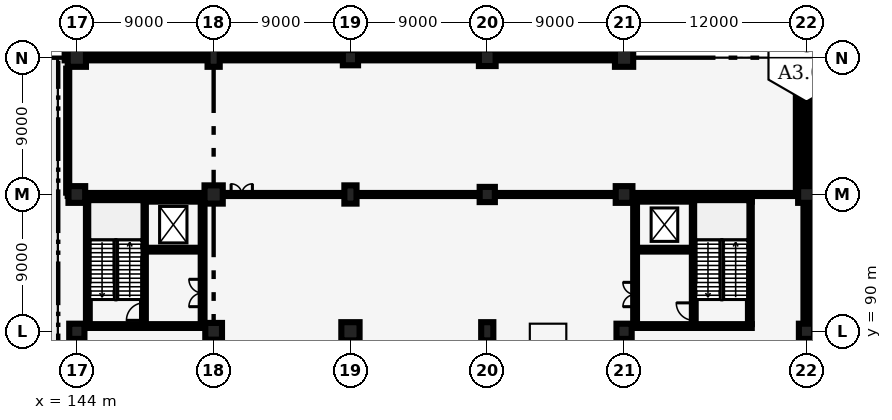
"""IFC4 building model, lengths in metres.
Left out: names, types, materials, properties, quantities, classifications, styles, units other than length and angle.
Written with IfcOpenShell. Run it as: python <this file> out.ifc"""

import sys

from ifc_helpers import new_model, si_unit, direction, frame, frame_2d, origin, origin_2d, place, context, subcontext, project, spatial, rectangle, extrude, element, fill, save


model = new_model("IFC4")
c1 = context("Model", 3, precision=1e-05, world=origin(), true_north=direction((0.0, 1.0)))
c2 = subcontext(c1, "Body", "Model", "MODEL_VIEW")
j1 = project(units=[si_unit("LENGTHUNIT", "METRE"), si_unit("PLANEANGLEUNIT", "RADIAN")], contexts=[c1])
p1 = place(None, origin())
s1 = spatial("IfcSite", under=j1, at=p1, CompositionType="ELEMENT")
p2 = place(p1, origin())
s2 = spatial("IfcBuilding", under=s1, at=p2, CompositionType="ELEMENT")
p3 = place(p2, frame((0.0, 0.0, -5.0)))
s3 = spatial("IfcBuildingStorey", under=s2, at=p3, CompositionType="ELEMENT", Elevation=-5.0)
p4 = place(p3, frame((144.0, 90.0, 0.0), z_axis=(0.0, 0.0, 1.0), x_axis=(1.0, 0.0, 0.0)))
e1 = element("IfcColumn", 1, at=p4, inside=s3, PredefinedType="COLUMN", context=c2, shape_type="SweptSolid", body=[
    extrude(rectangle(XDim=1.0, YDim=1.0, at=origin_2d()), origin(), (0.0, 0.0, 1.0), 5.0),
])
p5 = place(p3, frame((144.0, 99.0, 0.0), z_axis=(0.0, 0.0, 1.0), x_axis=(1.0, 0.0, 0.0)))
e2 = element("IfcColumn", 2, at=p5, inside=s3, PredefinedType="COLUMN", context=c2, shape_type="SweptSolid", body=[
    extrude(rectangle(XDim=1.1, YDim=1.1, at=origin_2d()), origin(), (0.0, 0.0, 1.0), 5.0),
])
p6 = place(p3, frame((144.0, 108.0, 0.0), z_axis=(0.0, 0.0, 1.0), x_axis=(1.0, 0.0, 0.0)))
e3 = element("IfcColumn", 3, at=p6, inside=s3, PredefinedType="COLUMN", context=c2, shape_type="SweptSolid", body=[
    extrude(rectangle(XDim=1.2, YDim=1.2, at=origin_2d()), origin(), (0.0, 0.0, 1.0), 5.0),
])
p7 = place(p3, frame((153.0, 90.0, 0.0), z_axis=(0.0, 0.0, 1.0), x_axis=(1.0, 0.0, 0.0)))
e4 = element("IfcColumn", 4, at=p7, inside=s3, PredefinedType="COLUMN", context=c2, shape_type="SweptSolid", body=[
    extrude(rectangle(XDim=1.1, YDim=1.1, at=origin_2d()), origin(), (0.0, 0.0, 1.0), 5.0),
])
p8 = place(p3, frame((153.0, 99.0, 0.0), z_axis=(0.0, 0.0, 1.0), x_axis=(1.0, 0.0, 0.0)))
e5 = element("IfcColumn", 5, at=p8, inside=s3, PredefinedType="COLUMN", context=c2, shape_type="SweptSolid", body=[
    extrude(rectangle(XDim=1.2, YDim=1.2, at=origin_2d()), origin(), (0.0, 0.0, 1.0), 5.0),
])
p9 = place(p3, frame((153.0, 108.0, 0.0), z_axis=(0.0, 0.0, 1.0), x_axis=(1.0, 0.0, 0.0)))
e6 = element("IfcColumn", 6, at=p9, inside=s3, PredefinedType="COLUMN", context=c2, shape_type="SweptSolid", body=[
    extrude(rectangle(XDim=0.8, YDim=1.2, at=origin_2d()), origin(), (0.0, 0.0, 1.0), 5.0),
])
p10 = place(p3, frame((162.0, 90.0, 0.0), z_axis=(0.0, 0.0, 1.0), x_axis=(1.0, 0.0, 0.0)))
e7 = element("IfcColumn", 7, at=p10, inside=s3, PredefinedType="COLUMN", context=c2, shape_type="SweptSolid", body=[
    extrude(rectangle(XDim=1.2, YDim=1.2, at=origin_2d()), origin(), (0.0, 0.0, 1.0), 5.0),
])
p11 = place(p3, frame((162.0, 99.0, 0.0), z_axis=(0.0, 0.0, 1.0), x_axis=(1.0, 0.0, 0.0)))
e8 = element("IfcColumn", 8, at=p11, inside=s3, PredefinedType="COLUMN", context=c2, shape_type="SweptSolid", body=[
    extrude(rectangle(XDim=0.8, YDim=1.2, at=origin_2d()), origin(), (0.0, 0.0, 1.0), 5.0),
])
p12 = place(p3, frame((162.0, 108.0, 0.0), z_axis=(0.0, 0.0, 1.0), x_axis=(1.0, 0.0, 0.0)))
e9 = element("IfcColumn", 9, at=p12, inside=s3, PredefinedType="COLUMN", context=c2, shape_type="SweptSolid", body=[
    extrude(rectangle(XDim=1.0, YDim=1.0, at=origin_2d()), origin(), (0.0, 0.0, 1.0), 5.0),
])
p13 = place(p3, frame((171.0, 90.0, 0.0), z_axis=(0.0, 0.0, 1.0), x_axis=(1.0, 0.0, 0.0)))
e10 = element("IfcColumn", 10, at=p13, inside=s3, PredefinedType="COLUMN", context=c2, shape_type="SweptSolid", body=[
    extrude(rectangle(XDim=0.8, YDim=1.2, at=origin_2d()), origin(), (0.0, 0.0, 1.0), 5.0),
])
p14 = place(p3, frame((171.0, 99.0, 0.0), z_axis=(0.0, 0.0, 1.0), x_axis=(1.0, 0.0, 0.0)))
e11 = element("IfcColumn", 11, at=p14, inside=s3, PredefinedType="COLUMN", context=c2, shape_type="SweptSolid", body=[
    extrude(rectangle(XDim=1.0, YDim=1.0, at=origin_2d()), origin(), (0.0, 0.0, 1.0), 5.0),
])
p15 = place(p3, frame((171.0, 108.0, 0.0), z_axis=(0.0, 0.0, 1.0), x_axis=(1.0, 0.0, 0.0)))
e12 = element("IfcColumn", 12, at=p15, inside=s3, PredefinedType="COLUMN", context=c2, shape_type="SweptSolid", body=[
    extrude(rectangle(XDim=1.1, YDim=1.1, at=origin_2d()), origin(), (0.0, 0.0, 1.0), 5.0),
])
p16 = place(p3, frame((180.0, 90.0, 0.0), z_axis=(0.0, 0.0, 1.0), x_axis=(1.0, 0.0, 0.0)))
e13 = element("IfcColumn", 13, at=p16, inside=s3, PredefinedType="COLUMN", context=c2, shape_type="SweptSolid", body=[
    extrude(rectangle(XDim=1.0, YDim=1.0, at=origin_2d()), origin(), (0.0, 0.0, 1.0), 5.0),
])
p17 = place(p3, frame((180.0, 99.0, 0.0), z_axis=(0.0, 0.0, 1.0), x_axis=(1.0, 0.0, 0.0)))
e14 = element("IfcColumn", 14, at=p17, inside=s3, PredefinedType="COLUMN", context=c2, shape_type="SweptSolid", body=[
    extrude(rectangle(XDim=1.1, YDim=1.1, at=origin_2d()), origin(), (0.0, 0.0, 1.0), 5.0),
])
p18 = place(p3, frame((180.0, 108.0, 0.0), z_axis=(0.0, 0.0, 1.0), x_axis=(1.0, 0.0, 0.0)))
e15 = element("IfcColumn", 15, at=p18, inside=s3, PredefinedType="COLUMN", context=c2, shape_type="SweptSolid", body=[
    extrude(rectangle(XDim=1.2, YDim=1.2, at=origin_2d()), origin(), (0.0, 0.0, 1.0), 5.0),
])
p19 = place(p3, frame((192.0, 90.0, 0.0), z_axis=(0.0, 0.0, 1.0), x_axis=(1.0, 0.0, 0.0)))
e16 = element("IfcColumn", 16, at=p19, inside=s3, PredefinedType="COLUMN", context=c2, shape_type="SweptSolid", body=[
    extrude(rectangle(XDim=1.0, YDim=1.0, at=origin_2d()), origin(), (0.0, 0.0, 1.0), 5.0),
])
p20 = place(p3, frame((192.0, 99.0, 0.0), z_axis=(0.0, 0.0, 1.0), x_axis=(1.0, 0.0, 0.0)))
e17 = element("IfcColumn", 17, at=p20, inside=s3, PredefinedType="COLUMN", context=c2, shape_type="SweptSolid", body=[
    extrude(rectangle(XDim=1.1, YDim=1.1, at=origin_2d()), origin(), (0.0, 0.0, 1.0), 5.0),
])
p21 = place(p3, frame((192.0, 108.0, 0.0), z_axis=(0.0, 0.0, 1.0), x_axis=(1.0, 0.0, 0.0)))
e18 = element("IfcColumn", 18, at=p21, inside=s3, PredefinedType="COLUMN", context=c2, shape_type="SweptSolid", body=[
    extrude(rectangle(XDim=1.2, YDim=1.2, at=origin_2d()), origin(), (0.0, 0.0, 1.0), 5.0),
])
p22 = place(p3, frame((192.0, 0.595, 0.0), z_axis=(0.0, 0.0, 1.0), x_axis=(0.0, 1.0, 0.0)))
e19 = element("IfcWall", 19, at=p22, inside=s3, PredefinedType="SHEAR", context=c2, shape_type="SweptSolid", body=[
    extrude(rectangle(XDim=106.81, YDim=0.4, at=frame_2d((53.405, 0.0))), origin(), (0.0, 0.0, 1.0), 3.95),
])
p23 = place(p3, frame((143.2, 108.0, 0.0), z_axis=(0.0, 0.0, 1.0), x_axis=(1.0, 0.0, 0.0)))
e20 = element("IfcWall", 20, at=p23, inside=s3, PredefinedType="SHEAR", context=c2, shape_type="SweptSolid", body=[
    extrude(rectangle(XDim=36.205, YDim=0.35, at=frame_2d((18.103, 0.0))), origin(), (0.0, 0.0, 1.0), 3.95),
])
p24 = place(p3, frame((180.725, 90.47, 0.0), z_axis=(0.0, 0.0, 1.0), x_axis=(0.0, 1.0, 0.0)))
e21 = element("IfcWall", 21, at=p24, inside=s3, PredefinedType="SHEAR", context=c2, shape_type="SweptSolid", body=[
    extrude(rectangle(XDim=8.06, YDim=0.25, at=frame_2d((4.03, 0.0))), origin(), (0.0, 0.0, 1.0), 4.64),
])
p25 = place(p24, frame((1.15, 0.0, 0.0)))
e22 = element("IfcOpeningElement", 22, at=p25, cuts=e21, PredefinedType="OPENING", context=c2, shape_type="SweptSolid", body=[
    extrude(rectangle(XDim=1.6, YDim=2.2, at=frame_2d((0.8, 1.1))), frame((0.0, 0.135, 0.0), z_axis=(0.0, -1.0, 0.0), x_axis=(1.0, 0.0, 0.0)), (0.0, 0.0, 1.0), 0.27),
])
p26 = place(p3, frame((188.275, 90.47, 0.0), z_axis=(0.0, 0.0, 1.0), x_axis=(0.0, 1.0, 0.0)))
e23 = element("IfcWall", 23, at=p26, inside=s3, PredefinedType="SHEAR", context=c2, shape_type="SweptSolid", body=[
    extrude(rectangle(XDim=8.06, YDim=0.25, at=frame_2d((4.03, 0.0))), origin(), (0.0, 0.0, 1.0), 4.64),
])
for number, where, z_axis, x_axis in (
    (24, (180.6, 90.345, 0.0), (0.0, 0.0, 1.0), (1.0, 0.0, 0.0)),
    (25, (180.6, 98.655, 0.0), (0.0, 0.0, 1.0), (1.0, 0.0, 0.0)),
):
    element("IfcWall", number, at=place(p3, frame(where, z_axis=z_axis, x_axis=x_axis)), inside=s3, PredefinedType="SHEAR", context=c2, shape_type="SweptSolid", body=[
        extrude(rectangle(XDim=7.8, YDim=0.25, at=frame_2d((3.9, 0.0))), origin(), (0.0, 0.0, 1.0), 4.64),
    ])
p27 = place(p3, frame((184.585, 90.47, 0.0), z_axis=(0.0, 0.0, 1.0), x_axis=(0.0, 1.0, 0.0)))
e26 = element("IfcWall", 26, at=p27, inside=s3, PredefinedType="SHEAR", context=c2, shape_type="SweptSolid", body=[
    extrude(rectangle(XDim=8.06, YDim=0.25, at=frame_2d((4.03, 0.0))), origin(), (0.0, 0.0, 1.0), 4.64),
])
p28 = place(p27, frame((0.25, 0.0, 0.0)))
e27 = element("IfcOpeningElement", 27, at=p28, cuts=e26, PredefinedType="OPENING", context=c2, shape_type="SweptSolid", body=[
    extrude(rectangle(XDim=1.15, YDim=2.15, at=frame_2d((0.575, 1.075))), frame((0.0, 0.135, 0.0), z_axis=(0.0, -1.0, 0.0), x_axis=(1.0, 0.0, 0.0)), (0.0, 0.0, 1.0), 0.27),
])
p29 = place(p3, frame((180.85, 95.37, 0.0), z_axis=(0.0, 0.0, 1.0), x_axis=(1.0, 0.0, 0.0)))
e28 = element("IfcWall", 28, at=p29, inside=s3, PredefinedType="SHEAR", context=c2, shape_type="SweptSolid", body=[
    extrude(rectangle(XDim=3.61, YDim=0.25, at=frame_2d((1.805, 0.0))), origin(), (0.0, 0.0, 1.0), 4.64),
])
p30 = place(p29, frame((0.95, 0.0, 0.0)))
e29 = element("IfcOpeningElement", 29, at=p30, cuts=e28, PredefinedType="OPENING", context=c2, shape_type="SweptSolid", body=[
    extrude(rectangle(XDim=1.2, YDim=2.2, at=frame_2d((0.6, 1.1))), frame((0.0, 0.135, 0.0), z_axis=(0.0, -1.0, 0.0), x_axis=(1.0, 0.0, 0.0)), (0.0, 0.0, 1.0), 0.27),
])
p31 = place(p3, frame((144.725, 90.47, 0.0), z_axis=(0.0, 0.0, 1.0), x_axis=(0.0, 1.0, 0.0)))
e30 = element("IfcWall", 30, at=p31, inside=s3, PredefinedType="SHEAR", context=c2, shape_type="SweptSolid", body=[
    extrude(rectangle(XDim=8.06, YDim=0.25, at=frame_2d((4.03, 0.0))), origin(), (0.0, 0.0, 1.0), 4.64),
])
p32 = place(p3, frame((152.275, 90.47, 0.0), z_axis=(0.0, 0.0, 1.0), x_axis=(0.0, 1.0, 0.0)))
e31 = element("IfcWall", 31, at=p32, inside=s3, PredefinedType="SHEAR", context=c2, shape_type="SweptSolid", body=[
    extrude(rectangle(XDim=8.06, YDim=0.25, at=frame_2d((4.03, 0.0))), origin(), (0.0, 0.0, 1.0), 4.64),
])
p33 = place(p32, frame((1.15, 0.0, 0.0)))
e32 = element("IfcOpeningElement", 32, at=p33, cuts=e31, PredefinedType="OPENING", context=c2, shape_type="SweptSolid", body=[
    extrude(rectangle(XDim=1.8, YDim=2.2, at=frame_2d((0.9, 1.1))), frame((0.0, 0.135, 0.0), z_axis=(0.0, -1.0, 0.0), x_axis=(1.0, 0.0, 0.0)), (0.0, 0.0, 1.0), 0.27),
])
for number, where, z_axis, x_axis in (
    (33, (144.6, 90.345, 0.0), (0.0, 0.0, 1.0), (1.0, 0.0, 0.0)),
    (34, (144.6, 98.655, 0.0), (0.0, 0.0, 1.0), (1.0, 0.0, 0.0)),
):
    element("IfcWall", number, at=place(p3, frame(where, z_axis=z_axis, x_axis=x_axis)), inside=s3, PredefinedType="SHEAR", context=c2, shape_type="SweptSolid", body=[
        extrude(rectangle(XDim=7.8, YDim=0.25, at=frame_2d((3.9, 0.0))), origin(), (0.0, 0.0, 1.0), 4.64),
    ])
p34 = place(p3, frame((148.415, 90.47, 0.0), z_axis=(0.0, 0.0, 1.0), x_axis=(0.0, 1.0, 0.0)))
e35 = element("IfcWall", 35, at=p34, inside=s3, PredefinedType="SHEAR", context=c2, shape_type="SweptSolid", body=[
    extrude(rectangle(XDim=8.06, YDim=0.25, at=frame_2d((4.03, 0.0))), origin(), (0.0, 0.0, 1.0), 4.64),
])
p35 = place(p34, frame((0.25, 0.0, 0.0)))
e36 = element("IfcOpeningElement", 36, at=p35, cuts=e35, PredefinedType="OPENING", context=c2, shape_type="SweptSolid", body=[
    extrude(rectangle(XDim=1.15, YDim=2.15, at=frame_2d((0.575, 1.075))), frame((0.0, 0.135, 0.0), z_axis=(0.0, -1.0, 0.0), x_axis=(1.0, 0.0, 0.0)), (0.0, 0.0, 1.0), 0.27),
])
p36 = place(p3, frame((148.54, 95.37, 0.0), z_axis=(0.0, 0.0, 1.0), x_axis=(1.0, 0.0, 0.0)))
e37 = element("IfcWall", 37, at=p36, inside=s3, PredefinedType="SHEAR", context=c2, shape_type="SweptSolid", body=[
    extrude(rectangle(XDim=3.61, YDim=0.25, at=frame_2d((1.805, 0.0))), origin(), (0.0, 0.0, 1.0), 4.64),
])
p37 = place(p36, frame((0.95, 0.0, 0.0)))
e38 = element("IfcOpeningElement", 38, at=p37, cuts=e37, PredefinedType="OPENING", context=c2, shape_type="SweptSolid", body=[
    extrude(rectangle(XDim=1.2, YDim=2.2, at=frame_2d((0.6, 1.1))), frame((0.0, 0.135, 0.0), z_axis=(0.0, -1.0, 0.0), x_axis=(1.0, 0.0, 0.0)), (0.0, 0.0, 1.0), 0.27),
])
p38 = place(p3, frame((143.4, 99.0, 0.0), z_axis=(0.0, 0.0, 1.0), x_axis=(1.0, 0.0, 0.0)))
e39 = element("IfcWall", 39, at=p38, inside=s3, PredefinedType="SOLIDWALL", context=c2, shape_type="SweptSolid", body=[
    extrude(rectangle(XDim=48.0, YDim=0.2, at=frame_2d((24.0, 0.0))), origin(), (0.0, 0.0, 1.0), 3.85),
])
p39 = place(p38, frame((10.75, 0.0, 0.0)))
e40 = element("IfcOpeningElement", 40, at=p39, cuts=e39, PredefinedType="OPENING", context=c2, shape_type="SweptSolid", body=[
    extrude(rectangle(XDim=1.4, YDim=2.25, at=frame_2d((0.7, 1.125))), frame((0.0, 0.11, 0.0), z_axis=(0.0, -1.0, 0.0), x_axis=(1.0, 0.0, 0.0)), (0.0, 0.0, 1.0), 0.22),
])
for number, where, z_axis, x_axis in (
    (41, (143.4, 99.12, 0.0), (0.0, 0.0, 1.0), (0.0, 1.0, 0.0)),
    (42, (191.4, 99.12, 0.0), (0.0, 0.0, 1.0), (0.0, 1.0, 0.0)),
):
    element("IfcWall", number, at=place(p3, frame(where, z_axis=z_axis, x_axis=x_axis)), inside=s3, PredefinedType="SOLIDWALL", context=c2, shape_type="SweptSolid", body=[
        extrude(rectangle(XDim=8.16, YDim=0.2, at=frame_2d((4.08, 0.0))), origin(), (0.0, 0.0, 1.0), 3.85),
    ])
p40 = place(p28, origin())
e43 = element("IfcDoor", 43, at=p40, inside=s3, OperationType="SINGLE_SWING_RIGHT", PredefinedType="DOOR", context=c2, shape_type="SweptSolid", body=[
    extrude(rectangle(XDim=1.15, YDim=2.15, at=frame_2d((0.575, 1.075))), frame((0.0, 0.025, 0.0), z_axis=(0.0, -1.0, 0.0), x_axis=(1.0, 0.0, 0.0)), (0.0, 0.0, 1.0), 0.05),
])
fill(e27, e43)
p41 = place(p30, origin())
e44 = element("IfcDoor", 44, at=p41, inside=s3, OperationType="DOUBLE_DOOR_SLIDING", PredefinedType="DOOR", context=c2, shape_type="SweptSolid", body=[
    extrude(rectangle(XDim=1.2, YDim=2.2, at=frame_2d((0.6, 1.1))), frame((0.0, 0.025, 0.0), z_axis=(0.0, -1.0, 0.0), x_axis=(1.0, 0.0, 0.0)), (0.0, 0.0, 1.0), 0.05),
])
fill(e29, e44)
p42 = place(p25, origin())
e45 = element("IfcDoor", 45, at=p42, inside=s3, OperationType="DOUBLE_DOOR_SINGLE_SWING", PredefinedType="DOOR", context=c2, shape_type="SweptSolid", body=[
    extrude(rectangle(XDim=1.6, YDim=2.2, at=frame_2d((0.8, 1.1))), frame((0.0, 0.025, 0.0), z_axis=(0.0, -1.0, 0.0), x_axis=(1.0, 0.0, 0.0)), (0.0, 0.0, 1.0), 0.05),
])
fill(e22, e45)
p43 = place(p35, origin())
e46 = element("IfcDoor", 46, at=p43, inside=s3, OperationType="SINGLE_SWING_LEFT", PredefinedType="DOOR", context=c2, shape_type="SweptSolid", body=[
    extrude(rectangle(XDim=1.15, YDim=2.15, at=frame_2d((0.575, 1.075))), frame((0.0, 0.025, 0.0), z_axis=(0.0, -1.0, 0.0), x_axis=(1.0, 0.0, 0.0)), (0.0, 0.0, 1.0), 0.05),
])
fill(e36, e46)
p44 = place(p37, origin())
e47 = element("IfcDoor", 47, at=p44, inside=s3, OperationType="DOUBLE_DOOR_SLIDING", PredefinedType="DOOR", context=c2, shape_type="SweptSolid", body=[
    extrude(rectangle(XDim=1.2, YDim=2.2, at=frame_2d((0.6, 1.1))), frame((0.0, 0.025, 0.0), z_axis=(0.0, -1.0, 0.0), x_axis=(1.0, 0.0, 0.0)), (0.0, 0.0, 1.0), 0.05),
])
fill(e38, e47)
p45 = place(p33, origin())
e48 = element("IfcDoor", 48, at=p45, inside=s3, OperationType="DOUBLE_DOOR_SINGLE_SWING", PredefinedType="DOOR", context=c2, shape_type="SweptSolid", body=[
    extrude(rectangle(XDim=1.8, YDim=2.2, at=frame_2d((0.9, 1.1))), frame((0.0, 0.025, 0.0), z_axis=(0.0, -1.0, 0.0), x_axis=(1.0, 0.0, 0.0)), (0.0, 0.0, 1.0), 0.05),
])
fill(e32, e48)
p46 = place(p39, origin())
e49 = element("IfcDoor", 49, at=p46, inside=s3, OperationType="DOUBLE_DOOR_SINGLE_SWING", PredefinedType="DOOR", context=c2, shape_type="SweptSolid", body=[
    extrude(rectangle(XDim=1.4, YDim=2.25, at=frame_2d((0.7, 1.125))), frame((0.0, 0.025, 0.0), z_axis=(0.0, -1.0, 0.0), x_axis=(1.0, 0.0, 0.0)), (0.0, 0.0, 1.0), 0.05),
])
fill(e40, e49)
save(model, sys.argv[1])
